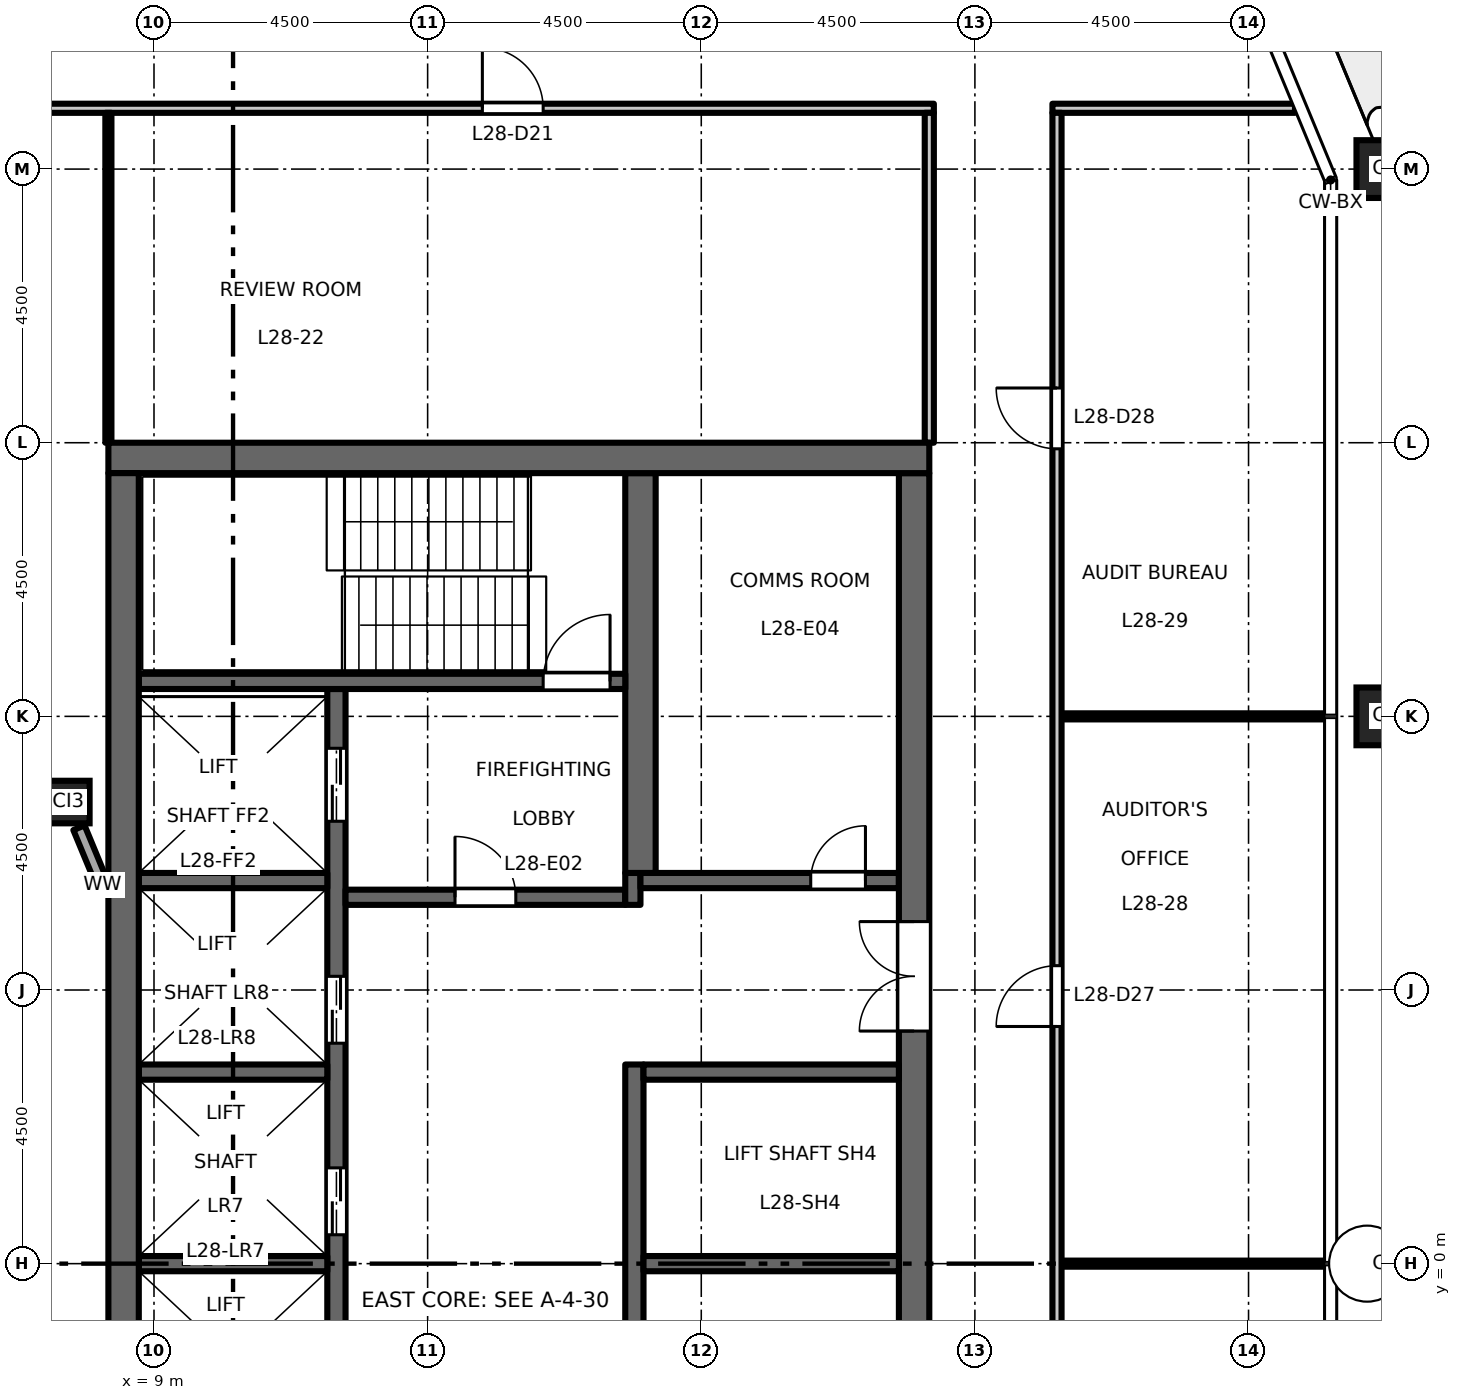
"""IFC4 building model, lengths in metres.
Left out: names, types, materials, properties, quantities, classifications, styles, units other than length and angle.
Written with IfcOpenShell. Run it as: python <this file> out.ifc"""

import sys

from ifc_helpers import new_model, si_unit, direction, frame, frame_2d, origin, origin_2d, place, context, subcontext, project, spatial, rectangle, hollow_rectangle, extrude, element, fill, save


model = new_model("IFC4")
c1 = context("Model", 3, precision=1e-05, world=origin(), true_north=direction((0.0, 1.0)))
c2 = subcontext(c1, "Body", "Model", "MODEL_VIEW")
j1 = project(units=[si_unit("LENGTHUNIT", "METRE"), si_unit("PLANEANGLEUNIT", "RADIAN")], contexts=[c1])
p1 = place(None, origin())
s1 = spatial("IfcSite", under=j1, at=p1, CompositionType="ELEMENT")
p2 = place(p1, origin())
s2 = spatial("IfcBuilding", under=s1, at=p2, CompositionType="ELEMENT")
p3 = place(p2, frame((0.0, 0.0, 131.7)))
s3 = spatial("IfcBuildingStorey", under=s2, at=p3, CompositionType="ELEMENT", Elevation=131.7)
for number, where, z_axis, x_axis in (
    (1, (29.25, 0.0, 0.0), (0.0, 0.0, 1.0), (1.0, 0.0, 0.0)),
    (2, (29.25, 9.0, 0.0), (0.0, 0.0, 1.0), (1.0, 0.0, 0.0)),
    (3, (29.25, 18.0, 0.0), (0.0, 0.0, 1.0), (1.0, 0.0, 0.0)),
):
    element("IfcColumn", number, at=place(p3, frame(where, z_axis=z_axis, x_axis=x_axis)), inside=s3, PredefinedType="COLUMN", context=c2, shape_type="SweptSolid", body=[
        extrude(hollow_rectangle(XDim=0.95, YDim=0.95, WallThickness=0.055, at=origin_2d()), origin(), (0.0, 0.0, 1.0), 4.5),
    ])
p4 = place(p3, frame((7.591, 7.591, 0.0), z_axis=(0.0, 0.0, 1.0), x_axis=(1.0, 0.0, 0.0)))
e4 = element("IfcColumn", 4, at=p4, inside=s3, PredefinedType="COLUMN", context=c2, shape_type="SweptSolid", body=[
    extrude(hollow_rectangle(XDim=0.7, YDim=0.7, WallThickness=0.04, at=origin_2d()), origin(), (0.0, 0.0, 1.0), 4.5),
])
p5 = place(p3, frame((12.0, -9.45, 0.0), z_axis=(0.0, 0.0, 1.0), x_axis=(0.0, 1.0, 0.0)))
e5 = element("IfcWall", 5, at=p5, inside=s3, PredefinedType="SHEAR", context=c2, shape_type="SweptSolid", body=[
    extrude(rectangle(XDim=18.9, YDim=0.3, at=frame_2d((9.45, 0.0))), origin(), (0.0, 0.0, 1.0), 4.35),
])
p6 = place(p5, frame((3.625, 0.0, 0.0)))
e6 = element("IfcOpeningElement", 6, at=p6, cuts=e5, PredefinedType="OPENING", context=c2, shape_type="SweptSolid", body=[
    extrude(rectangle(XDim=1.1, YDim=2.1, at=frame_2d((0.55, 1.05))), frame((0.0, 0.16, 0.0), z_axis=(0.0, -1.0, 0.0), x_axis=(1.0, 0.0, 0.0)), (0.0, 0.0, 1.0), 0.32),
])
p7 = place(p5, frame((6.775, 0.0, 0.0)))
e7 = element("IfcOpeningElement", 7, at=p7, cuts=e5, PredefinedType="OPENING", context=c2, shape_type="SweptSolid", body=[
    extrude(rectangle(XDim=1.1, YDim=2.1, at=frame_2d((0.55, 1.05))), frame((0.0, 0.16, 0.0), z_axis=(0.0, -1.0, 0.0), x_axis=(1.0, 0.0, 0.0)), (0.0, 0.0, 1.0), 0.32),
])
p8 = place(p5, frame((9.925, 0.0, 0.0)))
e8 = element("IfcOpeningElement", 8, at=p8, cuts=e5, PredefinedType="OPENING", context=c2, shape_type="SweptSolid", body=[
    extrude(rectangle(XDim=1.1, YDim=2.1, at=frame_2d((0.55, 1.05))), frame((0.0, 0.16, 0.0), z_axis=(0.0, -1.0, 0.0), x_axis=(1.0, 0.0, 0.0)), (0.0, 0.0, 1.0), 0.32),
])
p9 = place(p5, frame((13.075, 0.0, 0.0)))
e9 = element("IfcOpeningElement", 9, at=p9, cuts=e5, PredefinedType="OPENING", context=c2, shape_type="SweptSolid", body=[
    extrude(rectangle(XDim=1.1, YDim=2.1, at=frame_2d((0.55, 1.05))), frame((0.0, 0.16, 0.0), z_axis=(0.0, -1.0, 0.0), x_axis=(1.0, 0.0, 0.0)), (0.0, 0.0, 1.0), 0.32),
])
p10 = place(p5, frame((16.725, 0.0, 0.0)))
e10 = element("IfcOpeningElement", 10, at=p10, cuts=e5, PredefinedType="OPENING", context=c2, shape_type="SweptSolid", body=[
    extrude(rectangle(XDim=1.2, YDim=2.1, at=frame_2d((0.6, 1.05))), frame((0.0, 0.16, 0.0), z_axis=(0.0, -1.0, 0.0), x_axis=(1.0, 0.0, 0.0)), (0.0, 0.0, 1.0), 0.32),
])
p11 = place(p5, frame((0.975, 0.0, 0.0)))
e11 = element("IfcOpeningElement", 11, at=p11, cuts=e5, PredefinedType="OPENING", context=c2, shape_type="SweptSolid", body=[
    extrude(rectangle(XDim=1.2, YDim=2.1, at=frame_2d((0.6, 1.05))), frame((0.0, 0.16, 0.0), z_axis=(0.0, -1.0, 0.0), x_axis=(1.0, 0.0, 0.0)), (0.0, 0.0, 1.0), 0.32),
])
p12 = place(p3, frame((12.15, 6.025, 0.0), z_axis=(0.0, 0.0, 1.0), x_axis=(1.0, 0.0, 0.0)))
e12 = element("IfcWall", 12, at=p12, inside=s3, PredefinedType="SHEAR", context=c2, shape_type="SweptSolid", body=[
    extrude(rectangle(XDim=4.6, YDim=0.25, at=frame_2d((2.3, 0.0))), origin(), (0.0, 0.0, 1.0), 4.35),
])
p13 = place(p12, frame((1.8, 0.0, 0.0)))
e13 = element("IfcOpeningElement", 13, at=p13, cuts=e12, PredefinedType="OPENING", context=c2, shape_type="SweptSolid", body=[
    extrude(rectangle(XDim=1.0, YDim=2.1, at=frame_2d((0.5, 1.05))), frame((0.0, 0.135, 0.0), z_axis=(0.0, -1.0, 0.0), x_axis=(1.0, 0.0, 0.0)), (0.0, 0.0, 1.0), 0.27),
])
p14 = place(p3, frame((16.875, 5.9, 0.0), z_axis=(0.0, 0.0, 1.0), x_axis=(0.0, 1.0, 0.0)))
e14 = element("IfcWall", 14, at=p14, inside=s3, PredefinedType="SHEAR", context=c2, shape_type="SweptSolid", body=[
    extrude(rectangle(XDim=0.525, YDim=0.25, at=frame_2d((0.263, 0.0))), origin(), (0.0, 0.0, 1.0), 4.35),
])
p15 = place(p3, frame((17.0, 6.3, 0.0), z_axis=(0.0, 0.0, 1.0), x_axis=(1.0, 0.0, 0.0)))
e15 = element("IfcWall", 15, at=p15, inside=s3, PredefinedType="SHEAR", context=c2, shape_type="SweptSolid", body=[
    extrude(rectangle(XDim=4.25, YDim=0.25, at=frame_2d((2.125, 0.0))), origin(), (0.0, 0.0, 1.0), 4.35),
])
p16 = place(p15, frame((2.8, 0.0, 0.0)))
e16 = element("IfcOpeningElement", 16, at=p16, cuts=e15, PredefinedType="OPENING", context=c2, shape_type="SweptSolid", body=[
    extrude(rectangle(XDim=0.9, YDim=2.1, at=frame_2d((0.45, 1.05))), frame((0.0, 0.135, 0.0), z_axis=(0.0, -1.0, 0.0), x_axis=(1.0, 0.0, 0.0)), (0.0, 0.0, 1.0), 0.27),
])
p17 = place(p3, frame((21.5, -13.0, 0.0), z_axis=(0.0, 0.0, 1.0), x_axis=(0.0, 1.0, 0.0)))
e17 = element("IfcWall", 17, at=p17, inside=s3, PredefinedType="SHEAR", context=c2, shape_type="SweptSolid", body=[
    extrude(rectangle(XDim=26.0, YDim=0.5, at=frame_2d((13.0, 0.0))), origin(), (0.0, 0.0, 1.0), 4.35),
])
p18 = place(p17, frame((16.825, 0.0, 0.0)))
e18 = element("IfcOpeningElement", 18, at=p18, cuts=e17, PredefinedType="OPENING", context=c2, shape_type="SweptSolid", body=[
    extrude(rectangle(XDim=1.8, YDim=2.1, at=frame_2d((0.9, 1.05))), frame((0.0, 0.26, 0.0), z_axis=(0.0, -1.0, 0.0), x_axis=(1.0, 0.0, 0.0)), (0.0, 0.0, 1.0), 0.52),
])
p19 = place(p17, frame((7.375, 0.0, 0.0)))
e19 = element("IfcOpeningElement", 19, at=p19, cuts=e17, PredefinedType="OPENING", context=c2, shape_type="SweptSolid", body=[
    extrude(rectangle(XDim=1.8, YDim=2.1, at=frame_2d((0.9, 1.05))), frame((0.0, 0.26, 0.0), z_axis=(0.0, -1.0, 0.0), x_axis=(1.0, 0.0, 0.0)), (0.0, 0.0, 1.0), 0.52),
])
p20 = place(p17, frame((1.3, 0.0, 0.0)))
e20 = element("IfcOpeningElement", 20, at=p20, cuts=e17, PredefinedType="OPENING", context=c2, shape_type="SweptSolid", body=[
    extrude(rectangle(XDim=0.9, YDim=2.1, at=frame_2d((0.45, 1.05))), frame((0.0, 0.26, 0.0), z_axis=(0.0, -1.0, 0.0), x_axis=(1.0, 0.0, 0.0)), (0.0, 0.0, 1.0), 0.52),
])
p21 = place(p3, frame((16.9, -3.275, 0.0), z_axis=(0.0, 0.0, 1.0), x_axis=(0.0, 1.0, 0.0)))
e21 = element("IfcWall", 21, at=p21, inside=s3, PredefinedType="SHEAR", context=c2, shape_type="SweptSolid", body=[
    extrude(rectangle(XDim=6.55, YDim=0.3, at=frame_2d((3.275, 0.0))), origin(), (0.0, 0.0, 1.0), 4.35),
])
for number, where, z_axis, x_axis in (
    (22, (17.05, 0.0, 0.0), (0.0, 0.0, 1.0), (1.0, 0.0, 0.0)),
    (23, (17.05, 3.15, 0.0), (0.0, 0.0, 1.0), (1.0, 0.0, 0.0)),
):
    element("IfcWall", number, at=place(p3, frame(where, z_axis=z_axis, x_axis=x_axis)), inside=s3, PredefinedType="SHEAR", context=c2, shape_type="SweptSolid", body=[
        extrude(rectangle(XDim=4.2, YDim=0.25, at=frame_2d((2.1, 0.0))), origin(), (0.0, 0.0, 1.0), 4.35),
    ])
p22 = place(p3, frame((17.0, 6.425, 0.0), z_axis=(0.0, 0.0, 1.0), x_axis=(0.0, 1.0, 0.0)))
e24 = element("IfcWall", 24, at=p22, inside=s3, PredefinedType="SHEAR", context=c2, shape_type="SweptSolid", body=[
    extrude(rectangle(XDim=6.575, YDim=0.5, at=frame_2d((3.288, 0.0))), origin(), (0.0, 0.0, 1.0), 4.35),
])
for number, where, z_axis, x_axis in (
    (25, (8.75, 0.0, 0.0), (0.0, 0.0, 1.0), (1.0, 0.0, 0.0)),
    (26, (8.75, 3.15, 0.0), (0.0, 0.0, 1.0), (1.0, 0.0, 0.0)),
    (27, (8.75, 6.3, 0.0), (0.0, 0.0, 1.0), (1.0, 0.0, 0.0)),
):
    element("IfcWall", number, at=place(p3, frame(where, z_axis=z_axis, x_axis=x_axis)), inside=s3, PredefinedType="SHEAR", context=c2, shape_type="SweptSolid", body=[
        extrude(rectangle(XDim=3.1, YDim=0.25, at=frame_2d((1.55, 0.0))), origin(), (0.0, 0.0, 1.0), 4.35),
    ])
p23 = place(p3, frame((8.75, 9.575, 0.0), z_axis=(0.0, 0.0, 1.0), x_axis=(1.0, 0.0, 0.0)))
e28 = element("IfcWall", 28, at=p23, inside=s3, PredefinedType="SHEAR", context=c2, shape_type="SweptSolid", body=[
    extrude(rectangle(XDim=8.0, YDim=0.25, at=frame_2d((4.0, 0.0))), origin(), (0.0, 0.0, 1.0), 4.35),
])
p24 = place(p23, frame((6.65, 0.0, 0.0)))
e29 = element("IfcOpeningElement", 29, at=p24, cuts=e28, PredefinedType="OPENING", context=c2, shape_type="SweptSolid", body=[
    extrude(rectangle(XDim=1.1, YDim=2.1, at=frame_2d((0.55, 1.05))), frame((0.0, 0.135, 0.0), z_axis=(0.0, -1.0, 0.0), x_axis=(1.0, 0.0, 0.0)), (0.0, 0.0, 1.0), 0.27),
])
p25 = place(p3, frame((8.25, 13.25, 0.0), z_axis=(0.0, 0.0, 1.0), x_axis=(1.0, 0.0, 0.0)))
e30 = element("IfcWall", 30, at=p25, inside=s3, PredefinedType="SHEAR", context=c2, shape_type="SweptSolid", body=[
    extrude(rectangle(XDim=13.5, YDim=0.5, at=frame_2d((6.75, 0.0))), origin(), (0.0, 0.0, 1.0), 4.35),
])
p26 = place(p3, frame((8.5, -13.0, 0.0), z_axis=(0.0, 0.0, 1.0), x_axis=(0.0, 1.0, 0.0)))
e31 = element("IfcWall", 31, at=p26, inside=s3, PredefinedType="SHEAR", context=c2, shape_type="SweptSolid", body=[
    extrude(rectangle(XDim=26.0, YDim=0.5, at=frame_2d((13.0, 0.0))), origin(), (0.0, 0.0, 1.0), 4.35),
])
p27 = place(p3, frame((8.154, 6.231, 0.0), z_axis=(0.0, 0.0, 1.0), x_axis=(-0.382769662028, 0.923843810301, 0.0)))
e32 = element("IfcWall", 32, at=p27, inside=s3, PredefinedType="STANDARD", context=c2, shape_type="SweptSolid", body=[
    extrude(rectangle(XDim=1.015, YDim=0.2, at=frame_2d((0.507, 0.0))), origin(), (0.0, 0.0, 1.0), 3.826),
])
for number, where, z_axis, x_axis in (
    (33, (23.925, 0.0, 0.0), (0.0, 0.0, 1.0), (1.0, 0.0, 0.0)),
    (34, (23.925, 9.0, 0.0), (0.0, 0.0, 1.0), (1.0, 0.0, 0.0)),
):
    element("IfcWall", number, at=place(p3, frame(where, z_axis=z_axis, x_axis=x_axis)), inside=s3, PredefinedType="PARTITIONING", context=c2, shape_type="SweptSolid", body=[
        extrude(rectangle(XDim=4.335, YDim=0.1, at=frame_2d((2.167, 0.0))), origin(), (0.0, 0.0, 1.0), 4.35),
    ])
p28 = place(p3, frame((-21.825, 19.0, 0.0), z_axis=(0.0, 0.0, 1.0), x_axis=(1.0, 0.0, 0.0)))
e35 = element("IfcWall", 35, at=p28, inside=s3, PredefinedType="PARTITIONING", context=c2, shape_type="SweptSolid", body=[
    extrude(rectangle(XDim=43.65, YDim=0.15, at=frame_2d((21.825, 0.0))), origin(), (0.0, 0.0, 1.0), 4.35),
])
p29 = place(p28, frame((17.225, 0.0, 0.0)))
e36 = element("IfcOpeningElement", 36, at=p29, cuts=e35, PredefinedType="OPENING", context=c2, shape_type="SweptSolid", body=[
    extrude(rectangle(XDim=1.0, YDim=2.1, at=frame_2d((0.5, 1.05))), frame((0.0, 0.085, 0.0), z_axis=(0.0, -1.0, 0.0), x_axis=(1.0, 0.0, 0.0)), (0.0, 0.0, 1.0), 0.17),
])
p30 = place(p28, frame((25.475, 0.0, 0.0)))
e37 = element("IfcOpeningElement", 37, at=p30, cuts=e35, PredefinedType="OPENING", context=c2, shape_type="SweptSolid", body=[
    extrude(rectangle(XDim=1.0, YDim=2.1, at=frame_2d((0.5, 1.05))), frame((0.0, 0.085, 0.0), z_axis=(0.0, -1.0, 0.0), x_axis=(1.0, 0.0, 0.0)), (0.0, 0.0, 1.0), 0.17),
])
p31 = place(p28, frame((6.225, 0.0, 0.0)))
e38 = element("IfcOpeningElement", 38, at=p31, cuts=e35, PredefinedType="OPENING", context=c2, shape_type="SweptSolid", body=[
    extrude(rectangle(XDim=1.0, YDim=2.1, at=frame_2d((0.5, 1.05))), frame((0.0, 0.085, 0.0), z_axis=(0.0, -1.0, 0.0), x_axis=(1.0, 0.0, 0.0)), (0.0, 0.0, 1.0), 0.17),
])
p32 = place(p28, frame((36.225, 0.0, 0.0)))
e39 = element("IfcOpeningElement", 39, at=p32, cuts=e35, PredefinedType="OPENING", context=c2, shape_type="SweptSolid", body=[
    extrude(rectangle(XDim=1.0, YDim=2.1, at=frame_2d((0.5, 1.05))), frame((0.0, 0.085, 0.0), z_axis=(0.0, -1.0, 0.0), x_axis=(1.0, 0.0, 0.0)), (0.0, 0.0, 1.0), 0.17),
])
p33 = place(p3, frame((23.775, 19.0, 0.0), z_axis=(0.0, 0.0, 1.0), x_axis=(1.0, 0.0, 0.0)))
e40 = element("IfcWall", 40, at=p33, inside=s3, PredefinedType="PARTITIONING", context=c2, shape_type="SweptSolid", body=[
    extrude(rectangle(XDim=3.989, YDim=0.15, at=frame_2d((1.995, 0.0))), origin(), (0.0, 0.0, 1.0), 4.35),
])
p34 = place(p3, frame((8.25, 13.5, 0.0), z_axis=(0.0, 0.0, 1.0), x_axis=(0.0, 1.0, 0.0)))
e41 = element("IfcWall", 41, at=p34, inside=s3, PredefinedType="PARTITIONING", context=c2, shape_type="SweptSolid", body=[
    extrude(rectangle(XDim=5.425, YDim=0.1, at=frame_2d((2.712, 0.0))), origin(), (0.0, 0.0, 1.0), 4.35),
])
p35 = place(p3, frame((21.75, 13.5, 0.0), z_axis=(0.0, 0.0, 1.0), x_axis=(0.0, 1.0, 0.0)))
e42 = element("IfcWall", 42, at=p35, inside=s3, PredefinedType="PARTITIONING", context=c2, shape_type="SweptSolid", body=[
    extrude(rectangle(XDim=5.425, YDim=0.15, at=frame_2d((2.712, 0.0))), origin(), (0.0, 0.0, 1.0), 4.35),
])
p36 = place(p3, frame((23.85, -18.925, 0.0), z_axis=(0.0, 0.0, 1.0), x_axis=(0.0, 1.0, 0.0)))
e43 = element("IfcWall", 43, at=p36, inside=s3, PredefinedType="PARTITIONING", context=c2, shape_type="SweptSolid", body=[
    extrude(rectangle(XDim=37.85, YDim=0.15, at=frame_2d((18.925, 0.0))), origin(), (0.0, 0.0, 1.0), 4.35),
])
p37 = place(p36, frame((4.325, 0.0, 0.0)))
e44 = element("IfcOpeningElement", 44, at=p37, cuts=e43, PredefinedType="OPENING", context=c2, shape_type="SweptSolid", body=[
    extrude(rectangle(XDim=1.0, YDim=2.1, at=frame_2d((0.5, 1.05))), frame((0.0, 0.085, 0.0), z_axis=(0.0, -1.0, 0.0), x_axis=(1.0, 0.0, 0.0)), (0.0, 0.0, 1.0), 0.17),
])
p38 = place(p36, frame((13.825, 0.0, 0.0)))
e45 = element("IfcOpeningElement", 45, at=p38, cuts=e43, PredefinedType="OPENING", context=c2, shape_type="SweptSolid", body=[
    extrude(rectangle(XDim=1.0, YDim=2.1, at=frame_2d((0.5, 1.05))), frame((0.0, 0.085, 0.0), z_axis=(0.0, -1.0, 0.0), x_axis=(1.0, 0.0, 0.0)), (0.0, 0.0, 1.0), 0.17),
])
p39 = place(p36, frame((22.825, 0.0, 0.0)))
e46 = element("IfcOpeningElement", 46, at=p39, cuts=e43, PredefinedType="OPENING", context=c2, shape_type="SweptSolid", body=[
    extrude(rectangle(XDim=1.0, YDim=2.1, at=frame_2d((0.5, 1.05))), frame((0.0, 0.085, 0.0), z_axis=(0.0, -1.0, 0.0), x_axis=(1.0, 0.0, 0.0)), (0.0, 0.0, 1.0), 0.17),
])
p40 = place(p36, frame((32.325, 0.0, 0.0)))
e47 = element("IfcOpeningElement", 47, at=p40, cuts=e43, PredefinedType="OPENING", context=c2, shape_type="SweptSolid", body=[
    extrude(rectangle(XDim=1.0, YDim=2.1, at=frame_2d((0.5, 1.05))), frame((0.0, 0.085, 0.0), z_axis=(0.0, -1.0, 0.0), x_axis=(1.0, 0.0, 0.0)), (0.0, 0.0, 1.0), 0.17),
])
p41 = place(p13, origin())
e48 = element("IfcDoor", 48, at=p41, inside=s3, OperationType="SINGLE_SWING_RIGHT", PredefinedType="DOOR", context=c2, shape_type="SweptSolid", body=[
    extrude(rectangle(XDim=1.0, YDim=2.1, at=frame_2d((0.5, 1.05))), frame((0.0, 0.025, 0.0), z_axis=(0.0, -1.0, 0.0), x_axis=(1.0, 0.0, 0.0)), (0.0, 0.0, 1.0), 0.05),
])
fill(e13, e48)
p42 = place(p24, origin())
e49 = element("IfcDoor", 49, at=p42, inside=s3, OperationType="SINGLE_SWING_LEFT", PredefinedType="DOOR", context=c2, shape_type="SweptSolid", body=[
    extrude(rectangle(XDim=1.1, YDim=2.1, at=frame_2d((0.55, 1.05))), frame((0.0, 0.025, 0.0), z_axis=(0.0, -1.0, 0.0), x_axis=(1.0, 0.0, 0.0)), (0.0, 0.0, 1.0), 0.05),
])
fill(e29, e49)
p43 = place(p18, origin())
e50 = element("IfcDoor", 50, at=p43, inside=s3, OperationType="DOUBLE_DOOR_DOUBLE_SWING", PredefinedType="DOOR", context=c2, shape_type="SweptSolid", body=[
    extrude(rectangle(XDim=1.8, YDim=2.1, at=frame_2d((0.9, 1.05))), frame((0.0, 0.025, 0.0), z_axis=(0.0, -1.0, 0.0), x_axis=(1.0, 0.0, 0.0)), (0.0, 0.0, 1.0), 0.05),
])
fill(e18, e50)
p44 = place(p8, origin())
e51 = element("IfcDoor", 51, at=p44, inside=s3, OperationType="DOUBLE_DOOR_SLIDING", PredefinedType="DOOR", context=c2, shape_type="SweptSolid", body=[
    extrude(rectangle(XDim=1.1, YDim=2.1, at=frame_2d((0.55, 1.05))), frame((0.0, 0.025, 0.0), z_axis=(0.0, -1.0, 0.0), x_axis=(1.0, 0.0, 0.0)), (0.0, 0.0, 1.0), 0.05),
])
fill(e8, e51)
p45 = place(p9, origin())
e52 = element("IfcDoor", 52, at=p45, inside=s3, OperationType="DOUBLE_DOOR_SLIDING", PredefinedType="DOOR", context=c2, shape_type="SweptSolid", body=[
    extrude(rectangle(XDim=1.1, YDim=2.1, at=frame_2d((0.55, 1.05))), frame((0.0, 0.025, 0.0), z_axis=(0.0, -1.0, 0.0), x_axis=(1.0, 0.0, 0.0)), (0.0, 0.0, 1.0), 0.05),
])
fill(e9, e52)
p46 = place(p10, origin())
e53 = element("IfcDoor", 53, at=p46, inside=s3, OperationType="DOUBLE_DOOR_SLIDING", PredefinedType="DOOR", context=c2, shape_type="SweptSolid", body=[
    extrude(rectangle(XDim=1.2, YDim=2.1, at=frame_2d((0.6, 1.05))), frame((0.0, 0.025, 0.0), z_axis=(0.0, -1.0, 0.0), x_axis=(1.0, 0.0, 0.0)), (0.0, 0.0, 1.0), 0.05),
])
fill(e10, e53)
p47 = place(p16, origin())
e54 = element("IfcDoor", 54, at=p47, inside=s3, OperationType="SINGLE_SWING_LEFT", PredefinedType="DOOR", context=c2, shape_type="SweptSolid", body=[
    extrude(rectangle(XDim=0.9, YDim=2.1, at=frame_2d((0.45, 1.05))), frame((0.0, 0.025, 0.0), z_axis=(0.0, -1.0, 0.0), x_axis=(1.0, 0.0, 0.0)), (0.0, 0.0, 1.0), 0.05),
])
fill(e16, e54)
p48 = place(p32, origin())
e55 = element("IfcDoor", 55, at=p48, inside=s3, OperationType="SINGLE_SWING_LEFT", PredefinedType="DOOR", context=c2, shape_type="SweptSolid", body=[
    extrude(rectangle(XDim=1.0, YDim=2.1, at=frame_2d((0.5, 1.05))), frame((0.0, 0.025, 0.0), z_axis=(0.0, -1.0, 0.0), x_axis=(1.0, 0.0, 0.0)), (0.0, 0.0, 1.0), 0.05),
])
fill(e39, e55)
p49 = place(p39, origin())
e56 = element("IfcDoor", 56, at=p49, inside=s3, OperationType="SINGLE_SWING_LEFT", PredefinedType="DOOR", context=c2, shape_type="SweptSolid", body=[
    extrude(rectangle(XDim=1.0, YDim=2.1, at=frame_2d((0.5, 1.05))), frame((0.0, 0.025, 0.0), z_axis=(0.0, -1.0, 0.0), x_axis=(1.0, 0.0, 0.0)), (0.0, 0.0, 1.0), 0.05),
])
fill(e46, e56)
p50 = place(p40, origin())
e57 = element("IfcDoor", 57, at=p50, inside=s3, OperationType="SINGLE_SWING_RIGHT", PredefinedType="DOOR", context=c2, shape_type="SweptSolid", body=[
    extrude(rectangle(XDim=1.0, YDim=2.1, at=frame_2d((0.5, 1.05))), frame((0.0, 0.025, 0.0), z_axis=(0.0, -1.0, 0.0), x_axis=(1.0, 0.0, 0.0)), (0.0, 0.0, 1.0), 0.05),
])
fill(e47, e57)
save(model, sys.argv[1])
